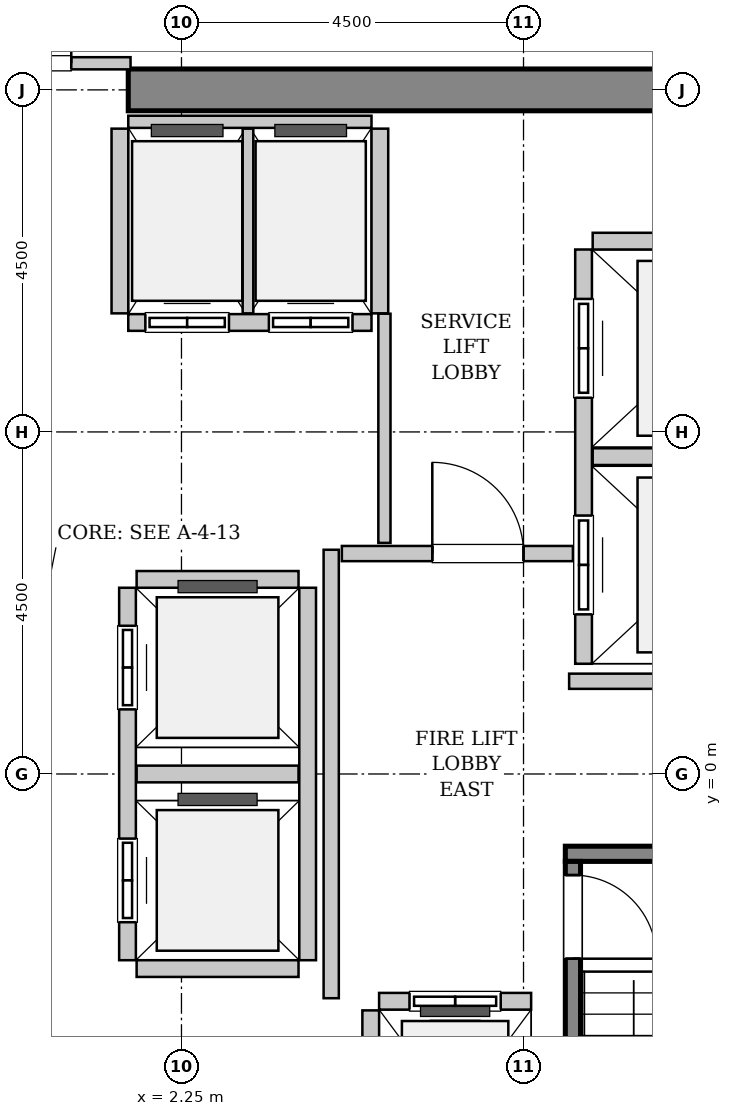
"""IFC4 building model, lengths in metres.
Left out: names, types, materials, properties, quantities, classifications, styles, units other than length and angle.
Written with IfcOpenShell. Run it as: python <this file> out.ifc"""

import sys

from ifc_helpers import new_model, si_unit, direction, frame, frame_2d, origin, place, context, subcontext, project, spatial, rectangle, extrude, source, transform, mapped, element, fill, save


model = new_model("IFC4")
c1 = context("Model", 3, precision=1e-05, world=origin(), true_north=direction((0.0, 1.0)))
c2 = subcontext(c1, "Body", "Model", "MODEL_VIEW")
j1 = project(units=[si_unit("LENGTHUNIT", "METRE"), si_unit("PLANEANGLEUNIT", "RADIAN")], contexts=[c1])
p1 = place(None, origin())
s1 = spatial("IfcSite", under=j1, at=p1, CompositionType="ELEMENT")
p2 = place(p1, origin())
s2 = spatial("IfcBuilding", under=s1, at=p2, CompositionType="ELEMENT")
p3 = place(p2, frame((0.0, 0.0, 144.0)))
s3 = spatial("IfcBuildingStorey", under=s2, at=p3, CompositionType="ELEMENT", Elevation=144.0)
m1 = source(origin(), c2, "Body", "SweptSolid", [
    extrude(rectangle(XDim=9.975, YDim=0.55, at=frame_2d((4.987, 0.0))), origin(), (0.0, 0.0, 1.0), 4.8),
])
p4 = place(p3, frame((1.55, 9.0, 0.0), z_axis=(0.0, 0.0, 1.0), x_axis=(1.0, 0.0, 0.0)))
e1 = element("IfcWall", 1, at=p4, inside=s3, PredefinedType="SHEAR", context=c2, shape_type="MappedRepresentation", body=[
    mapped(m1, transform((0.0, 0.0, 0.0), x_axis=(1.0, 0.0, 0.0), y_axis=(0.0, 1.0, 0.0), z_axis=(0.0, 0.0, 1.0), scale=1.0)),
])
m2 = source(origin(), c2, "Body", "SweptSolid", [
    extrude(rectangle(XDim=3.4, YDim=0.2, at=frame_2d((1.7, 0.0))), origin(), (0.0, 0.0, 1.0), 4.8),
])
p5 = place(p3, frame((7.3, -1.05, 0.0), z_axis=(0.0, 0.0, 1.0), x_axis=(1.0, 0.0, 0.0)))
e2 = element("IfcWall", 2, at=p5, inside=s3, PredefinedType="SOLIDWALL", context=c2, shape_type="MappedRepresentation", body=[
    mapped(m2, transform((0.0, 0.0, 0.0), x_axis=(1.0, 0.0, 0.0), y_axis=(0.0, 1.0, 0.0), z_axis=(0.0, 0.0, 1.0), scale=1.0)),
])
m3 = source(origin(), c2, "Body", "SweptSolid", [
    extrude(rectangle(XDim=7.1, YDim=0.2, at=frame_2d((3.55, 0.0))), origin(), (0.0, 0.0, 1.0), 4.8),
])
p6 = place(p3, frame((7.4, -1.15, 0.0), z_axis=(0.0, 0.0, 1.0), x_axis=(0.0, -1.0, 0.0)))
e3 = element("IfcWall", 3, at=p6, inside=s3, PredefinedType="SOLIDWALL", context=c2, shape_type="MappedRepresentation", body=[
    mapped(m3, transform((0.0, 0.0, 0.0), x_axis=(1.0, 0.0, 0.0), y_axis=(0.0, 1.0, 0.0), z_axis=(0.0, 0.0, 1.0), scale=1.0)),
])
p7 = place(p6, frame((0.18, 0.0, 0.0)))
e4 = element("IfcOpeningElement", 4, at=p7, cuts=e3, PredefinedType="OPENING", context=c2, shape_type="SweptSolid", body=[
    extrude(rectangle(XDim=1.1, YDim=2.15, at=frame_2d((0.55, 1.075))), frame((0.0, 0.11, 0.0), z_axis=(0.0, -1.0, 0.0), x_axis=(1.0, 0.0, 0.0)), (0.0, 0.0, 1.0), 0.22),
])
m4 = source(origin(), c2, "Body", "SweptSolid", [
    extrude(rectangle(XDim=2.0, YDim=0.22, at=frame_2d((1.0, 0.0))), origin(), (0.0, 0.0, 1.0), 4.535),
])
p8 = place(p3, frame((6.85, -2.99, 0.0), z_axis=(0.0, 0.0, 1.0), x_axis=(-1.0, 0.0, 0.0)))
e5 = element("IfcWall", 5, at=p8, inside=s3, PredefinedType="SOLIDWALL", context=c2, shape_type="MappedRepresentation", body=[
    mapped(m4, transform((0.0, 0.0, 0.0), x_axis=(1.0, 0.0, 0.0), y_axis=(0.0, 1.0, 0.0), z_axis=(0.0, 0.0, 1.0), scale=1.0)),
])
p9 = place(p8, frame((0.4, 0.0, 0.0)))
e6 = element("IfcOpeningElement", 6, at=p9, cuts=e5, PredefinedType="OPENING", context=c2, shape_type="SweptSolid", body=[
    extrude(rectangle(XDim=1.2, YDim=2.2, at=frame_2d((0.6, 1.1))), frame((0.0, 0.12, 0.0), z_axis=(0.0, -1.0, 0.0), x_axis=(1.0, 0.0, 0.0)), (0.0, 0.0, 1.0), 0.24),
])
m5 = source(origin(), c2, "Body", "SweptSolid", [
    extrude(rectangle(XDim=2.68, YDim=0.22, at=frame_2d((1.34, 0.0))), origin(), (0.0, 0.0, 1.0), 4.535),
])
p10 = place(p3, frame((4.74, -3.11, 0.0), z_axis=(0.0, 0.0, 1.0), x_axis=(0.0, -1.0, 0.0)))
e7 = element("IfcWall", 7, at=p10, inside=s3, PredefinedType="SOLIDWALL", context=c2, shape_type="MappedRepresentation", body=[
    mapped(m5, transform((0.0, 0.0, 0.0), x_axis=(1.0, 0.0, 0.0), y_axis=(0.0, 1.0, 0.0), z_axis=(0.0, 0.0, 1.0), scale=1.0)),
])
m6 = source(origin(), c2, "Body", "SweptSolid", [
    extrude(rectangle(XDim=5.45, YDim=0.22, at=frame_2d((2.725, 0.0))), origin(), (0.0, 0.0, 1.0), 4.535),
])
p11 = place(p3, frame((7.54, 6.9, 0.0), z_axis=(0.0, 0.0, 1.0), x_axis=(0.0, -1.0, 0.0)))
e8 = element("IfcWall", 8, at=p11, inside=s3, PredefinedType="SOLIDWALL", context=c2, shape_type="MappedRepresentation", body=[
    mapped(m6, transform((0.0, 0.0, 0.0), x_axis=(1.0, 0.0, 0.0), y_axis=(0.0, 1.0, 0.0), z_axis=(0.0, 0.0, 1.0), scale=1.0)),
])
p12 = place(p11, frame((3.5, 0.0, 0.0)))
e9 = element("IfcOpeningElement", 9, at=p12, cuts=e8, PredefinedType="OPENING", context=c2, shape_type="SweptSolid", body=[
    extrude(rectangle(XDim=1.3, YDim=2.3, at=frame_2d((0.65, 1.15))), frame((0.0, 0.12, 0.0), z_axis=(0.0, -1.0, 0.0), x_axis=(1.0, 0.0, 0.0)), (0.0, 0.0, 1.0), 0.24),
])
p13 = place(p11, frame((0.65, 0.0, 0.0)))
e10 = element("IfcOpeningElement", 10, at=p13, cuts=e8, PredefinedType="OPENING", context=c2, shape_type="SweptSolid", body=[
    extrude(rectangle(XDim=1.3, YDim=2.3, at=frame_2d((0.65, 1.15))), frame((0.0, 0.12, 0.0), z_axis=(0.0, -1.0, 0.0), x_axis=(1.0, 0.0, 0.0)), (0.0, 0.0, 1.0), 0.24),
])
m7 = source(origin(), c2, "Body", "SweptSolid", [
    extrude(rectangle(XDim=2.78, YDim=0.22, at=frame_2d((1.39, 0.0))), origin(), (0.0, 0.0, 1.0), 4.535),
])
for number, where, z_axis, x_axis in (
    (11, (7.66, 4.175, 0.0), (0.0, 0.0, 1.0), (1.0, 0.0, 0.0)),
    (12, (10.44, 7.01, 0.0), (0.0, 0.0, 1.0), (-1.0, 0.0, 0.0)),
):
    element("IfcWall", number, at=place(p3, frame(where, z_axis=z_axis, x_axis=x_axis)), inside=s3, PredefinedType="SOLIDWALL", context=c2, shape_type="MappedRepresentation", body=[
        mapped(m7, transform((0.0, 0.0, 0.0), x_axis=(1.0, 0.0, 0.0), y_axis=(0.0, 1.0, 0.0), z_axis=(0.0, 0.0, 1.0), scale=1.0)),
    ])
m8 = source(origin(), c2, "Body", "SweptSolid", [
    extrude(rectangle(XDim=3.2, YDim=0.22, at=frame_2d((1.6, 0.0))), origin(), (0.0, 0.0, 1.0), 4.535),
])
p14 = place(p3, frame((1.55, 5.94, 0.0), z_axis=(0.0, 0.0, 1.0), x_axis=(1.0, 0.0, 0.0)))
e13 = element("IfcWall", 13, at=p14, inside=s3, PredefinedType="SOLIDWALL", context=c2, shape_type="MappedRepresentation", body=[
    mapped(m8, transform((0.0, 0.0, 0.0), x_axis=(1.0, 0.0, 0.0), y_axis=(0.0, 1.0, 0.0), z_axis=(0.0, 0.0, 1.0), scale=1.0)),
])
p15 = place(p14, frame((0.225, 0.0, 0.0)))
e14 = element("IfcOpeningElement", 14, at=p15, cuts=e13, PredefinedType="OPENING", context=c2, shape_type="SweptSolid", body=[
    extrude(rectangle(XDim=1.1, YDim=2.2, at=frame_2d((0.55, 1.1))), frame((0.0, 0.12, 0.0), z_axis=(0.0, -1.0, 0.0), x_axis=(1.0, 0.0, 0.0)), (0.0, 0.0, 1.0), 0.24),
])
p16 = place(p14, frame((1.85, 0.0, 0.0)))
e15 = element("IfcOpeningElement", 15, at=p16, cuts=e13, PredefinedType="OPENING", context=c2, shape_type="SweptSolid", body=[
    extrude(rectangle(XDim=1.1, YDim=2.2, at=frame_2d((0.55, 1.1))), frame((0.0, 0.12, 0.0), z_axis=(0.0, -1.0, 0.0), x_axis=(1.0, 0.0, 0.0)), (0.0, 0.0, 1.0), 0.24),
])
m9 = source(origin(), c2, "Body", "SweptSolid", [
    extrude(rectangle(XDim=3.2, YDim=0.16, at=frame_2d((1.6, 0.0))), origin(), (0.0, 0.0, 1.0), 3.425),
])
p17 = place(p3, frame((4.75, 8.58, 0.0), z_axis=(0.0, 0.0, 1.0), x_axis=(-1.0, 0.0, 0.0)))
e16 = element("IfcWall", 16, at=p17, inside=s3, PredefinedType="PARTITIONING", context=c2, shape_type="MappedRepresentation", body=[
    mapped(m9, transform((0.0, 0.0, 0.0), x_axis=(1.0, 0.0, 0.0), y_axis=(0.0, 1.0, 0.0), z_axis=(0.0, 0.0, 1.0), scale=1.0)),
])
m10 = source(origin(), c2, "Body", "SweptSolid", [
    extrude(rectangle(XDim=2.43, YDim=0.22, at=frame_2d((1.215, 0.0))), origin(), (0.0, 0.0, 1.0), 4.535),
])
p18 = place(p3, frame((1.44, 8.49, 0.0), z_axis=(0.0, 0.0, 1.0), x_axis=(0.0, -1.0, 0.0)))
e17 = element("IfcWall", 17, at=p18, inside=s3, PredefinedType="SOLIDWALL", context=c2, shape_type="MappedRepresentation", body=[
    mapped(m10, transform((0.0, 0.0, 0.0), x_axis=(1.0, 0.0, 0.0), y_axis=(0.0, 1.0, 0.0), z_axis=(0.0, 0.0, 1.0), scale=1.0)),
])
m11 = source(origin(), c2, "Body", "SweptSolid", [
    extrude(rectangle(XDim=2.43, YDim=0.14, at=frame_2d((1.215, 0.0))), origin(), (0.0, 0.0, 1.0), 4.535),
])
p19 = place(p3, frame((3.125, 6.06, 0.0), z_axis=(0.0, 0.0, 1.0), x_axis=(0.0, 1.0, 0.0)))
e18 = element("IfcWall", 18, at=p19, inside=s3, PredefinedType="PARTITIONING", context=c2, shape_type="MappedRepresentation", body=[
    mapped(m11, transform((0.0, 0.0, 0.0), x_axis=(1.0, 0.0, 0.0), y_axis=(0.0, 1.0, 0.0), z_axis=(0.0, 0.0, 1.0), scale=1.0)),
])
p20 = place(p3, frame((4.86, 6.06, 0.0), z_axis=(0.0, 0.0, 1.0), x_axis=(0.0, 1.0, 0.0)))
e19 = element("IfcWall", 19, at=p20, inside=s3, PredefinedType="SOLIDWALL", context=c2, shape_type="MappedRepresentation", body=[
    mapped(m10, transform((0.0, 0.0, 0.0), x_axis=(1.0, 0.0, 0.0), y_axis=(0.0, 1.0, 0.0), z_axis=(0.0, 0.0, 1.0), scale=1.0)),
])
m12 = source(origin(), c2, "Body", "SweptSolid", [
    extrude(rectangle(XDim=4.9, YDim=0.22, at=frame_2d((2.45, 0.0))), origin(), (0.0, 0.0, 1.0), 4.535),
])
p21 = place(p3, frame((1.54, 2.45, 0.0), z_axis=(0.0, 0.0, 1.0), x_axis=(0.0, -1.0, 0.0)))
e20 = element("IfcWall", 20, at=p21, inside=s3, PredefinedType="SOLIDWALL", context=c2, shape_type="MappedRepresentation", body=[
    mapped(m12, transform((0.0, 0.0, 0.0), x_axis=(1.0, 0.0, 0.0), y_axis=(0.0, 1.0, 0.0), z_axis=(0.0, 0.0, 1.0), scale=1.0)),
])
p22 = place(p21, frame((3.3, 0.0, 0.0)))
e21 = element("IfcOpeningElement", 21, at=p22, cuts=e20, PredefinedType="OPENING", context=c2, shape_type="SweptSolid", body=[
    extrude(rectangle(XDim=1.1, YDim=2.2, at=frame_2d((0.55, 1.1))), frame((0.0, 0.12, 0.0), z_axis=(0.0, -1.0, 0.0), x_axis=(1.0, 0.0, 0.0)), (0.0, 0.0, 1.0), 0.24),
])
p23 = place(p21, frame((0.5, 0.0, 0.0)))
e22 = element("IfcOpeningElement", 22, at=p23, cuts=e20, PredefinedType="OPENING", context=c2, shape_type="SweptSolid", body=[
    extrude(rectangle(XDim=1.1, YDim=2.2, at=frame_2d((0.55, 1.1))), frame((0.0, 0.12, 0.0), z_axis=(0.0, -1.0, 0.0), x_axis=(1.0, 0.0, 0.0)), (0.0, 0.0, 1.0), 0.24),
])
p24 = place(p3, frame((3.91, -2.45, 0.0), z_axis=(0.0, 0.0, 1.0), x_axis=(0.0, 1.0, 0.0)))
e23 = element("IfcWall", 23, at=p24, inside=s3, PredefinedType="SOLIDWALL", context=c2, shape_type="MappedRepresentation", body=[
    mapped(m12, transform((0.0, 0.0, 0.0), x_axis=(1.0, 0.0, 0.0), y_axis=(0.0, 1.0, 0.0), z_axis=(0.0, 0.0, 1.0), scale=1.0)),
])
m13 = source(origin(), c2, "Body", "SweptSolid", [
    extrude(rectangle(XDim=2.13, YDim=0.22, at=frame_2d((1.065, 0.0))), origin(), (0.0, 0.0, 1.0), 4.535),
])
for number, where, z_axis, x_axis in (
    (24, (1.66, -2.56, 0.0), (0.0, 0.0, 1.0), (1.0, 0.0, 0.0)),
    (25, (1.66, 0.0, 0.0), (0.0, 0.0, 1.0), (1.0, 0.0, 0.0)),
    (26, (3.79, 2.56, 0.0), (0.0, 0.0, 1.0), (-1.0, 0.0, 0.0)),
):
    element("IfcWall", number, at=place(p3, frame(where, z_axis=z_axis, x_axis=x_axis)), inside=s3, PredefinedType="SOLIDWALL", context=c2, shape_type="MappedRepresentation", body=[
        mapped(m13, transform((0.0, 0.0, 0.0), x_axis=(1.0, 0.0, 0.0), y_axis=(0.0, 1.0, 0.0), z_axis=(0.0, 0.0, 1.0), scale=1.0)),
    ])
m14 = source(origin(), c2, "Body", "SweptSolid", [
    extrude(rectangle(XDim=5.9, YDim=0.2, at=frame_2d((2.95, 0.0))), origin(), (0.0, 0.0, 1.0), 4.535),
])
p25 = place(p3, frame((4.22, -2.95, 0.0), z_axis=(0.0, 0.0, 1.0), x_axis=(0.0, 1.0, 0.0)))
e27 = element("IfcWall", 27, at=p25, inside=s3, PredefinedType="PARTITIONING", context=c2, shape_type="MappedRepresentation", body=[
    mapped(m14, transform((0.0, 0.0, 0.0), x_axis=(1.0, 0.0, 0.0), y_axis=(0.0, 1.0, 0.0), z_axis=(0.0, 0.0, 1.0), scale=1.0)),
])
m15 = source(origin(), c2, "Body", "SweptSolid", [
    extrude(rectangle(XDim=3.04, YDim=0.2, at=frame_2d((1.52, 0.0))), origin(), (0.0, 0.0, 1.0), 4.535),
])
p26 = place(p3, frame((4.36, 2.9, 0.0), z_axis=(0.0, 0.0, 1.0), x_axis=(1.0, 0.0, 0.0)))
e28 = element("IfcWall", 28, at=p26, inside=s3, PredefinedType="PARTITIONING", context=c2, shape_type="MappedRepresentation", body=[
    mapped(m15, transform((0.0, 0.0, 0.0), x_axis=(1.0, 0.0, 0.0), y_axis=(0.0, 1.0, 0.0), z_axis=(0.0, 0.0, 1.0), scale=1.0)),
])
p27 = place(p26, frame((1.19, 0.0, 0.0)))
e29 = element("IfcOpeningElement", 29, at=p27, cuts=e28, PredefinedType="OPENING", context=c2, shape_type="SweptSolid", body=[
    extrude(rectangle(XDim=1.2, YDim=2.15, at=frame_2d((0.6, 1.075))), frame((0.0, 0.11, 0.0), z_axis=(0.0, -1.0, 0.0), x_axis=(1.0, 0.0, 0.0)), (0.0, 0.0, 1.0), 0.22),
])
m16 = source(origin(), c2, "Body", "SweptSolid", [
    extrude(rectangle(XDim=4.11, YDim=0.2, at=frame_2d((2.055, 0.0))), origin(), (0.0, 0.0, 1.0), 4.535),
])
p28 = place(p3, frame((7.35, 1.22, 0.0), z_axis=(0.0, 0.0, 1.0), x_axis=(1.0, 0.0, 0.0)))
e30 = element("IfcWall", 30, at=p28, inside=s3, PredefinedType="PARTITIONING", context=c2, shape_type="MappedRepresentation", body=[
    mapped(m16, transform((0.0, 0.0, 0.0), x_axis=(1.0, 0.0, 0.0), y_axis=(0.0, 1.0, 0.0), z_axis=(0.0, 0.0, 1.0), scale=1.0)),
])
m17 = source(origin(), c2, "Body", "SweptSolid", [
    extrude(rectangle(XDim=3.16, YDim=0.16, at=frame_2d((1.58, 0.0))), origin(), (0.0, 0.0, 1.0), 3.425),
])
p29 = place(p3, frame((-1.58, 9.35, 0.0), z_axis=(0.0, 0.0, 1.0), x_axis=(1.0, 0.0, 0.0)))
e31 = element("IfcWall", 31, at=p29, inside=s3, PredefinedType="PARTITIONING", context=c2, shape_type="MappedRepresentation", body=[
    mapped(m17, transform((0.0, 0.0, 0.0), x_axis=(1.0, 0.0, 0.0), y_axis=(0.0, 1.0, 0.0), z_axis=(0.0, 0.0, 1.0), scale=1.0)),
])
p30 = place(p29, frame((0.78, 0.0, 0.0)))
e32 = element("IfcOpeningElement", 32, at=p30, cuts=e31, PredefinedType="OPENING", context=c2, shape_type="SweptSolid", body=[
    extrude(rectangle(XDim=1.6, YDim=2.3, at=frame_2d((0.8, 1.15))), frame((0.0, 0.09, 0.0), z_axis=(0.0, -1.0, 0.0), x_axis=(1.0, 0.0, 0.0)), (0.0, 0.0, 1.0), 0.18),
])
m18 = source(origin(), c2, "Body", "SweptSolid", [
    extrude(rectangle(XDim=3.015, YDim=0.16, at=frame_2d((1.507, 0.0))), origin(), (0.0, 0.0, 1.0), 4.535),
])
p31 = place(p3, frame((4.92, 3.04, 0.0), z_axis=(0.0, 0.0, 1.0), x_axis=(0.0, 1.0, 0.0)))
e33 = element("IfcWall", 33, at=p31, inside=s3, PredefinedType="PARTITIONING", context=c2, shape_type="MappedRepresentation", body=[
    mapped(m18, transform((0.0, 0.0, 0.0), x_axis=(1.0, 0.0, 0.0), y_axis=(0.0, 1.0, 0.0), z_axis=(0.0, 0.0, 1.0), scale=1.0)),
])
m19 = source(origin(), c2, "Body", "SweptSolid", [
    extrude(rectangle(XDim=1.1, YDim=2.15, at=frame_2d((0.55, 1.075))), frame((0.0, 0.025, 0.0), z_axis=(0.0, -1.0, 0.0), x_axis=(1.0, 0.0, 0.0)), (0.0, 0.0, 1.0), 0.05),
])
p32 = place(p7, origin())
e34 = element("IfcDoor", 34, at=p32, inside=s3, OperationType="SINGLE_SWING_RIGHT", PredefinedType="DOOR", context=c2, shape_type="MappedRepresentation", body=[
    mapped(m19, transform((0.0, 0.0, 0.0), x_axis=(1.0, 0.0, 0.0), y_axis=(0.0, 1.0, 0.0), z_axis=(0.0, 0.0, 1.0), scale=1.0)),
])
fill(e4, e34)
m20 = source(origin(), c2, "Body", "SweptSolid", [
    extrude(rectangle(XDim=1.2, YDim=2.2, at=frame_2d((0.6, 1.1))), frame((0.0, 0.025, 0.0), z_axis=(0.0, -1.0, 0.0), x_axis=(1.0, 0.0, 0.0)), (0.0, 0.0, 1.0), 0.05),
])
p33 = place(p9, origin())
e35 = element("IfcDoor", 35, at=p33, inside=s3, OperationType="SLIDING_TO_LEFT", PredefinedType="DOOR", context=c2, shape_type="MappedRepresentation", body=[
    mapped(m20, transform((0.0, 0.0, 0.0), x_axis=(1.0, 0.0, 0.0), y_axis=(0.0, 1.0, 0.0), z_axis=(0.0, 0.0, 1.0), scale=1.0)),
])
fill(e6, e35)
m21 = source(origin(), c2, "Body", "SweptSolid", [
    extrude(rectangle(XDim=1.3, YDim=2.3, at=frame_2d((0.65, 1.15))), frame((0.0, 0.025, 0.0), z_axis=(0.0, -1.0, 0.0), x_axis=(1.0, 0.0, 0.0)), (0.0, 0.0, 1.0), 0.05),
])
p34 = place(p12, origin())
e36 = element("IfcDoor", 36, at=p34, inside=s3, OperationType="SLIDING_TO_RIGHT", PredefinedType="DOOR", context=c2, shape_type="MappedRepresentation", body=[
    mapped(m21, transform((0.0, 0.0, 0.0), x_axis=(1.0, 0.0, 0.0), y_axis=(0.0, 1.0, 0.0), z_axis=(0.0, 0.0, 1.0), scale=1.0)),
])
fill(e9, e36)
p35 = place(p13, origin())
e37 = element("IfcDoor", 37, at=p35, inside=s3, OperationType="SLIDING_TO_RIGHT", PredefinedType="DOOR", context=c2, shape_type="MappedRepresentation", body=[
    mapped(m21, transform((0.0, 0.0, 0.0), x_axis=(1.0, 0.0, 0.0), y_axis=(0.0, 1.0, 0.0), z_axis=(0.0, 0.0, 1.0), scale=1.0)),
])
fill(e10, e37)
m22 = source(origin(), c2, "Body", "SweptSolid", [
    extrude(rectangle(XDim=1.1, YDim=2.2, at=frame_2d((0.55, 1.1))), frame((0.0, 0.025, 0.0), z_axis=(0.0, -1.0, 0.0), x_axis=(1.0, 0.0, 0.0)), (0.0, 0.0, 1.0), 0.05),
])
p36 = place(p15, origin())
e38 = element("IfcDoor", 38, at=p36, inside=s3, OperationType="DOUBLE_DOOR_SLIDING", PredefinedType="DOOR", context=c2, shape_type="MappedRepresentation", body=[
    mapped(m22, transform((0.0, 0.0, 0.0), x_axis=(1.0, 0.0, 0.0), y_axis=(0.0, 1.0, 0.0), z_axis=(0.0, 0.0, 1.0), scale=1.0)),
])
fill(e14, e38)
p37 = place(p16, origin())
e39 = element("IfcDoor", 39, at=p37, inside=s3, OperationType="DOUBLE_DOOR_SLIDING", PredefinedType="DOOR", context=c2, shape_type="MappedRepresentation", body=[
    mapped(m22, transform((0.0, 0.0, 0.0), x_axis=(1.0, 0.0, 0.0), y_axis=(0.0, 1.0, 0.0), z_axis=(0.0, 0.0, 1.0), scale=1.0)),
])
fill(e15, e39)
p38 = place(p22, origin())
e40 = element("IfcDoor", 40, at=p38, inside=s3, OperationType="DOUBLE_DOOR_SLIDING", PredefinedType="DOOR", context=c2, shape_type="MappedRepresentation", body=[
    mapped(m22, transform((0.0, 0.0, 0.0), x_axis=(1.0, 0.0, 0.0), y_axis=(0.0, 1.0, 0.0), z_axis=(0.0, 0.0, 1.0), scale=1.0)),
])
fill(e21, e40)
p39 = place(p23, origin())
e41 = element("IfcDoor", 41, at=p39, inside=s3, OperationType="DOUBLE_DOOR_SLIDING", PredefinedType="DOOR", context=c2, shape_type="MappedRepresentation", body=[
    mapped(m22, transform((0.0, 0.0, 0.0), x_axis=(1.0, 0.0, 0.0), y_axis=(0.0, 1.0, 0.0), z_axis=(0.0, 0.0, 1.0), scale=1.0)),
])
fill(e22, e41)
m23 = source(origin(), c2, "Body", "SweptSolid", [
    extrude(rectangle(XDim=1.2, YDim=2.15, at=frame_2d((0.6, 1.075))), frame((0.0, 0.025, 0.0), z_axis=(0.0, -1.0, 0.0), x_axis=(1.0, 0.0, 0.0)), (0.0, 0.0, 1.0), 0.05),
])
p40 = place(p27, origin())
e42 = element("IfcDoor", 42, at=p40, inside=s3, OperationType="SINGLE_SWING_LEFT", PredefinedType="DOOR", context=c2, shape_type="MappedRepresentation", body=[
    mapped(m23, transform((0.0, 0.0, 0.0), x_axis=(1.0, 0.0, 0.0), y_axis=(0.0, 1.0, 0.0), z_axis=(0.0, 0.0, 1.0), scale=1.0)),
])
fill(e29, e42)
m24 = source(origin(), c2, "Body", "SweptSolid", [
    extrude(rectangle(XDim=1.6, YDim=2.3, at=frame_2d((0.8, 1.15))), frame((0.0, 0.025, 0.0), z_axis=(0.0, -1.0, 0.0), x_axis=(1.0, 0.0, 0.0)), (0.0, 0.0, 1.0), 0.05),
])
p41 = place(p30, origin())
e43 = element("IfcDoor", 43, at=p41, inside=s3, OperationType="DOUBLE_DOOR_SINGLE_SWING", PredefinedType="DOOR", context=c2, shape_type="MappedRepresentation", body=[
    mapped(m24, transform((0.0, 0.0, 0.0), x_axis=(1.0, 0.0, 0.0), y_axis=(0.0, 1.0, 0.0), z_axis=(0.0, 0.0, 1.0), scale=1.0)),
])
fill(e32, e43)
save(model, sys.argv[1])
